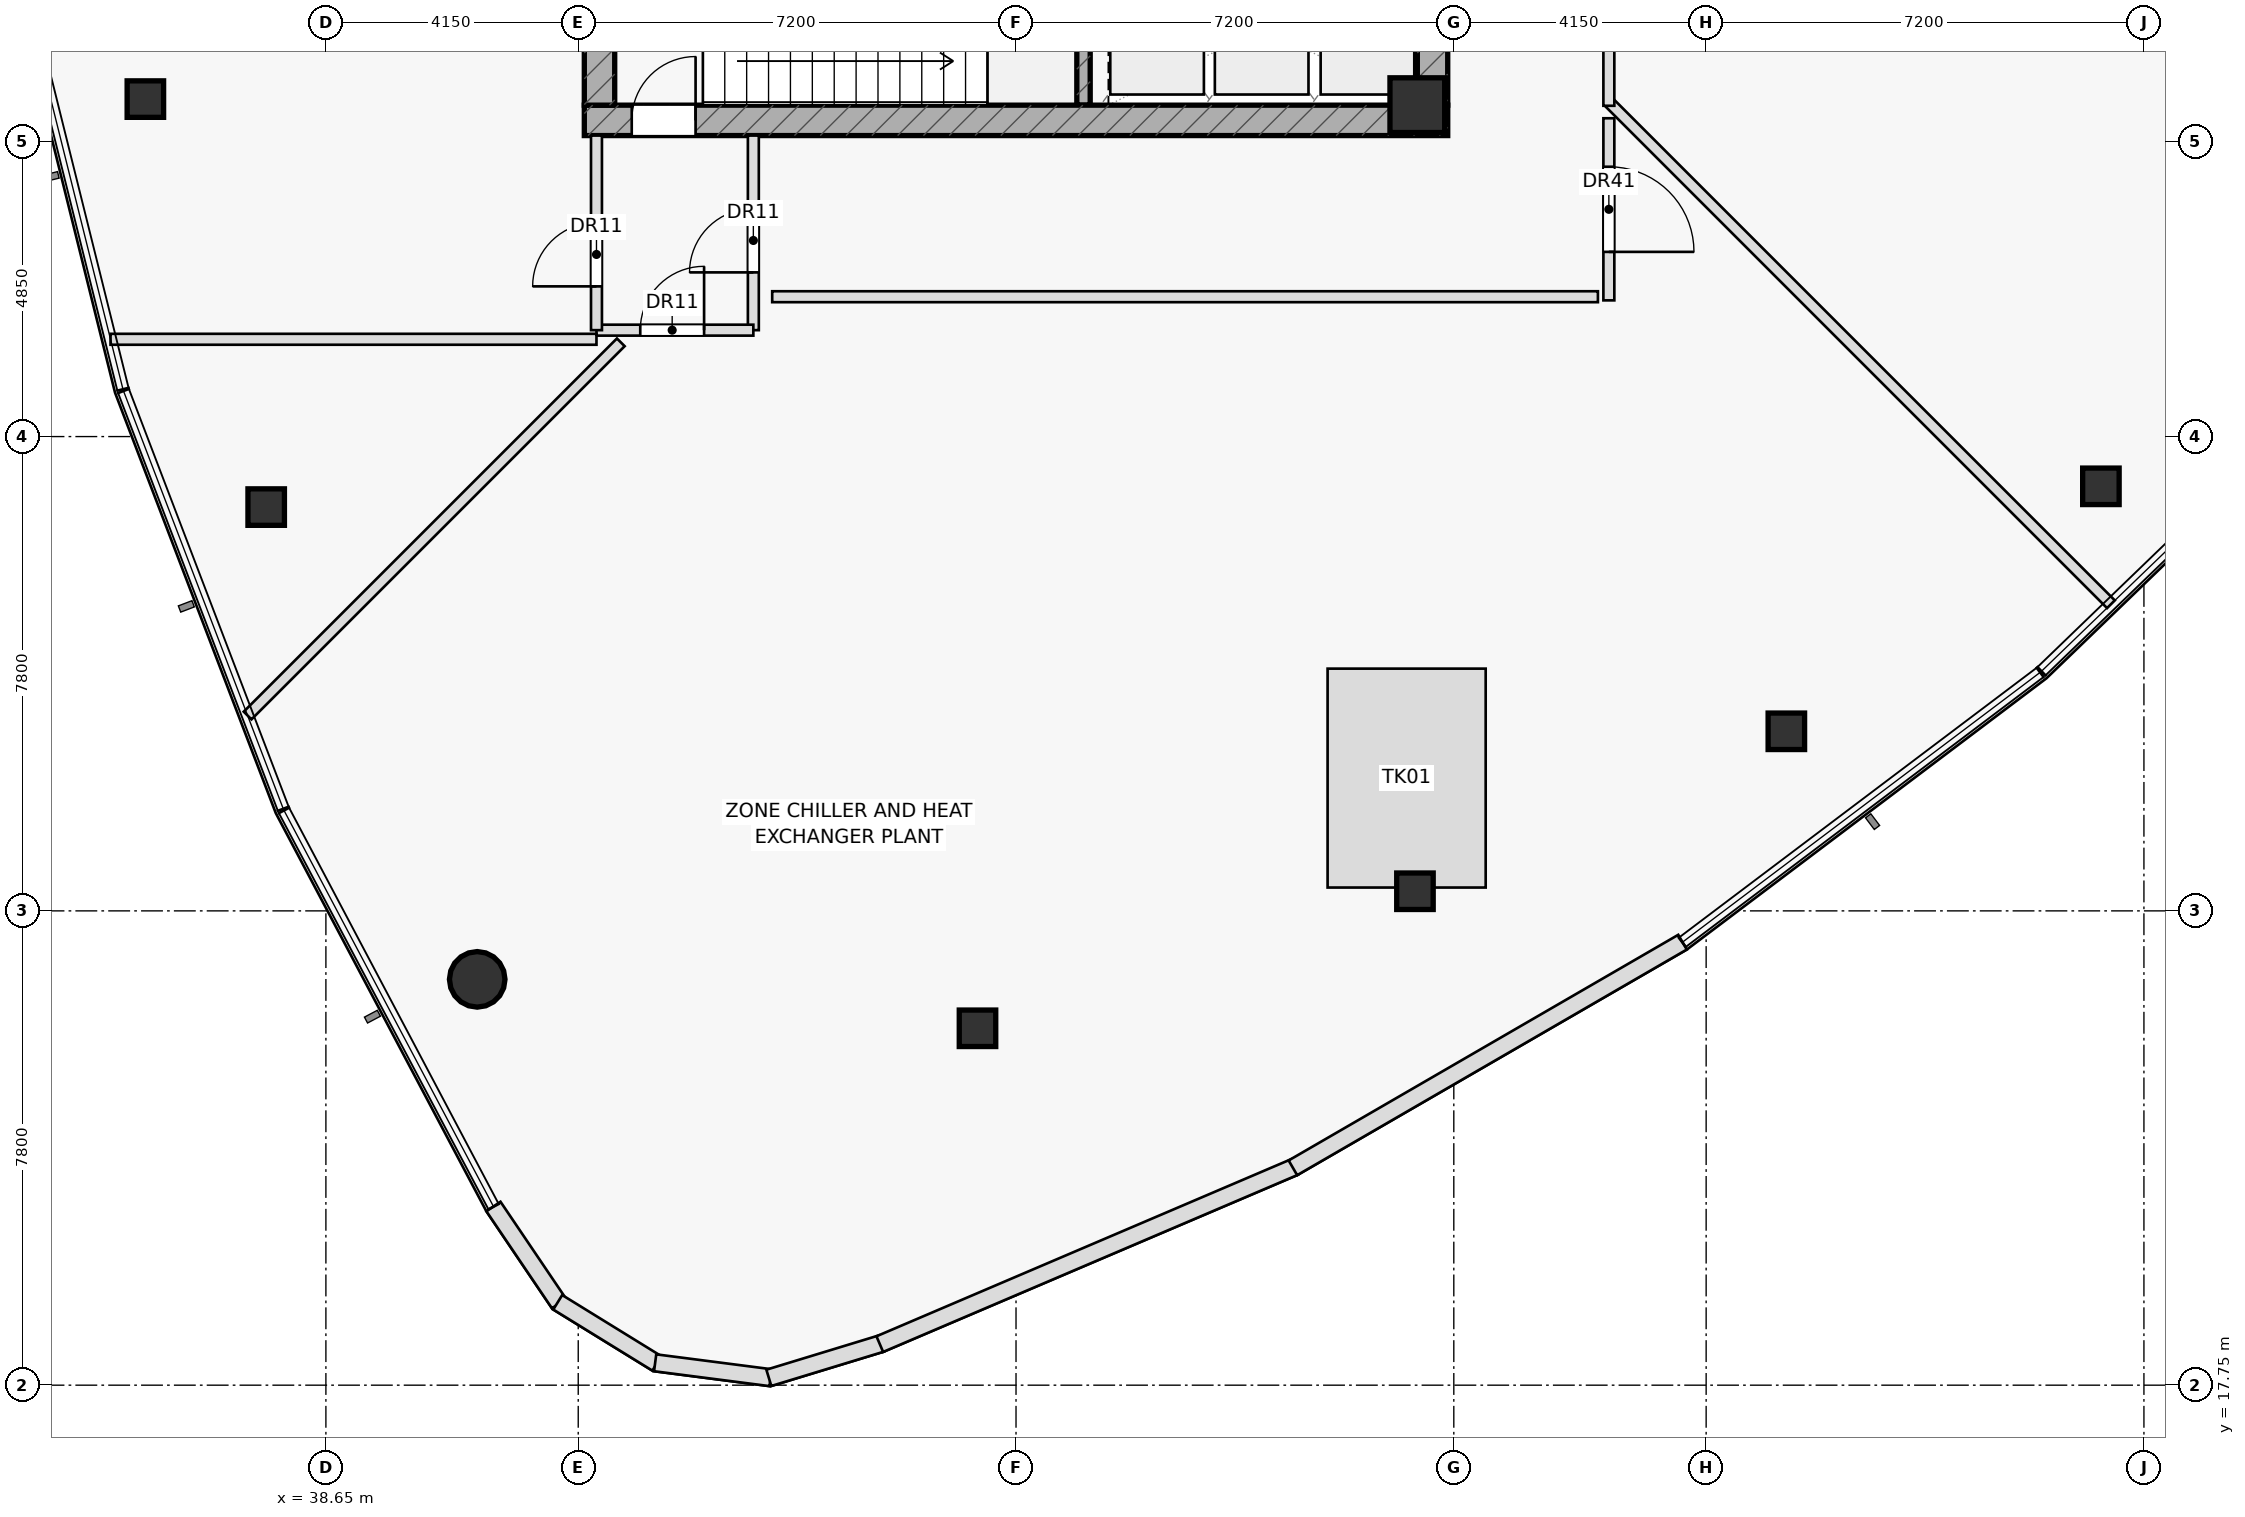
"""IFC4 building model, lengths in metres.
Left out: names, types, materials, properties, quantities, classifications, styles, units other than length and angle.
Written with IfcOpenShell. Run it as: python <this file> out.ifc"""

import sys

from ifc_helpers import new_model, si_unit, direction, frame, frame_2d, origin, origin_2d, place, context, subcontext, project, spatial, rectangle, hollow_rectangle, hollow_circle, extrude, element, fill, save


model = new_model("IFC4")
c1 = context("Model", 3, precision=1e-05, world=origin(), true_north=direction((0.0, 1.0)))
c2 = subcontext(c1, "Body", "Model", "MODEL_VIEW")
j1 = project(units=[si_unit("LENGTHUNIT", "METRE"), si_unit("PLANEANGLEUNIT", "RADIAN")], contexts=[c1])
p1 = place(None, origin())
s1 = spatial("IfcSite", under=j1, at=p1, CompositionType="ELEMENT")
p2 = place(p1, origin())
s2 = spatial("IfcBuilding", under=s1, at=p2, CompositionType="ELEMENT")
p3 = place(p2, frame((0.0, 0.0, 204.15)))
s3 = spatial("IfcBuildingStorey", under=s2, at=p3, CompositionType="ELEMENT", Elevation=204.15)
p4 = place(p3, frame((51.11, 38.8, 0.0), z_axis=(0.0, 0.0, 1.0), x_axis=(0.0, 1.0, 0.0)))
e1 = element("IfcWall", 1, at=p4, inside=s3, PredefinedType="SHEAR", context=c2, shape_type="SweptSolid", body=[
    extrude(rectangle(XDim=3.1, YDim=0.22, at=frame_2d((1.55, 0.0))), origin(), (0.0, 0.0, 1.0), 4.55),
])
p5 = place(p3, frame((42.9, 38.55, 0.0), z_axis=(0.0, 0.0, 1.0), x_axis=(1.0, 0.0, 0.0)))
e2 = element("IfcWall", 2, at=p5, inside=s3, PredefinedType="SHEAR", context=c2, shape_type="SweptSolid", body=[
    extrude(rectangle(XDim=14.2, YDim=0.5, at=frame_2d((7.1, 0.0))), origin(), (0.0, 0.0, 1.0), 4.55),
])
p6 = place(p5, frame((0.78, 0.0, 0.0)))
e3 = element("IfcOpeningElement", 3, at=p6, cuts=e2, PredefinedType="OPENING", context=c2, shape_type="SweptSolid", body=[
    extrude(rectangle(XDim=1.05, YDim=2.2, at=frame_2d((0.525, 1.1))), frame((0.0, 0.26, 0.0), z_axis=(0.0, -1.0, 0.0), x_axis=(1.0, 0.0, 0.0)), (0.0, 0.0, 1.0), 0.52),
])
p7 = place(p3, frame((43.15, 38.8, 0.0), z_axis=(0.0, 0.0, 1.0), x_axis=(0.0, 1.0, 0.0)))
e4 = element("IfcWall", 4, at=p7, inside=s3, PredefinedType="SHEAR", context=c2, shape_type="SweptSolid", body=[
    extrude(rectangle(XDim=12.4, YDim=0.5, at=frame_2d((6.2, 0.0))), origin(), (0.0, 0.0, 1.0), 4.55),
])
p8 = place(p3, frame((56.85, 38.8, 0.0), z_axis=(0.0, 0.0, 1.0), x_axis=(0.0, 1.0, 0.0)))
e5 = element("IfcWall", 5, at=p8, inside=s3, PredefinedType="SHEAR", context=c2, shape_type="SweptSolid", body=[
    extrude(rectangle(XDim=12.4, YDim=0.5, at=frame_2d((6.2, 0.0))), origin(), (0.0, 0.0, 1.0), 4.55),
])
p9 = place(p8, frame((3.85, 0.0, 0.0)))
e6 = element("IfcOpeningElement", 6, at=p9, cuts=e5, PredefinedType="OPENING", context=c2, shape_type="SweptSolid", body=[
    extrude(rectangle(XDim=1.5, YDim=2.2, at=frame_2d((0.75, 1.1))), frame((0.0, 0.26, 0.0), z_axis=(0.0, -1.0, 0.0), x_axis=(1.0, 0.0, 0.0)), (0.0, 0.0, 1.0), 0.52),
])
p10 = place(p3, frame((56.6, 38.8, 0.0), z_axis=(0.0, 0.0, 1.0), x_axis=(1.0, 0.0, 0.0)))
e7 = element("IfcColumn", 7, at=p10, inside=s3, PredefinedType="COLUMN", context=c2, shape_type="SweptSolid", body=[
    extrude(rectangle(XDim=0.9, YDim=0.9, at=origin_2d()), origin(), (0.0, 0.0, 1.0), 4.55),
])
for number, where, z_axis, x_axis in (
    (8, (35.681, 38.9, 0.0), (0.0, 0.0, 1.0), (1.0, 0.0, 0.0)),
    (9, (37.668, 32.19, 0.0), (0.0, 0.0, 1.0), (1.0, 0.0, 0.0)),
):
    element("IfcColumn", number, at=place(p3, frame(where, z_axis=z_axis, x_axis=x_axis)), inside=s3, PredefinedType="COLUMN", context=c2, shape_type="SweptSolid", body=[
        extrude(hollow_rectangle(XDim=0.6, YDim=0.6, WallThickness=0.036, at=origin_2d()), origin(), (0.0, 0.0, 1.0), 4.55),
    ])
p11 = place(p3, frame((41.139, 24.424, 0.0), z_axis=(0.0, 0.0, 1.0), x_axis=(1.0, 0.0, 0.0)))
e10 = element("IfcColumn", 10, at=p11, inside=s3, PredefinedType="COLUMN", context=c2, shape_type="SweptSolid", body=[
    extrude(hollow_circle(Radius=0.457, WallThickness=0.04, at=origin_2d()), origin(), (0.0, 0.0, 1.0), 4.55),
])
p12 = place(p3, frame((49.366, 23.619, 0.0), z_axis=(0.0, 0.0, 1.0), x_axis=(1.0, 0.0, 0.0)))
e11 = element("IfcColumn", 11, at=p12, inside=s3, PredefinedType="COLUMN", context=c2, shape_type="SweptSolid", body=[
    extrude(hollow_rectangle(XDim=0.6, YDim=0.6, WallThickness=0.036, at=origin_2d()), origin(), (0.0, 0.0, 1.0), 4.55),
])
for number, where, z_axis, x_axis in (
    (12, (56.561, 25.873, 0.0), (0.0, 0.0, 1.0), (1.0, 0.0, 0.0)),
    (13, (62.669, 28.503, 0.0), (0.0, 0.0, 1.0), (1.0, 0.0, 0.0)),
    (14, (67.842, 32.532, 0.0), (0.0, 0.0, 1.0), (1.0, 0.0, 0.0)),
):
    element("IfcColumn", number, at=place(p3, frame(where, z_axis=z_axis, x_axis=x_axis)), inside=s3, PredefinedType="COLUMN", context=c2, shape_type="SweptSolid", body=[
        extrude(hollow_rectangle(XDim=0.6, YDim=0.6, WallThickness=0.036, at=origin_2d()), origin(), (0.0, 0.0, 1.0), 5.0),
    ])
p13 = place(p3, frame((45.68, 35.1, 0.0), z_axis=(0.0, 0.0, 1.0), x_axis=(0.0, 1.0, 0.0)))
e15 = element("IfcWall", 15, at=p13, inside=s3, PredefinedType="PARTITIONING", context=c2, shape_type="SweptSolid", body=[
    extrude(rectangle(XDim=3.2, YDim=0.18, at=frame_2d((1.6, 0.0))), origin(), (0.0, 0.0, 1.0), 4.55),
])
p14 = place(p13, frame((0.95, 0.0, 0.0)))
e16 = element("IfcOpeningElement", 16, at=p14, cuts=e15, PredefinedType="OPENING", context=c2, shape_type="SweptSolid", body=[
    extrude(rectangle(XDim=1.05, YDim=2.2, at=frame_2d((0.525, 1.1))), frame((0.0, 0.1, 0.0), z_axis=(0.0, -1.0, 0.0), x_axis=(1.0, 0.0, 0.0)), (0.0, 0.0, 1.0), 0.2),
])
p15 = place(p3, frame((43.1, 35.1, 0.0), z_axis=(0.0, 0.0, 1.0), x_axis=(1.0, 0.0, 0.0)))
e17 = element("IfcWall", 17, at=p15, inside=s3, PredefinedType="PARTITIONING", context=c2, shape_type="SweptSolid", body=[
    extrude(rectangle(XDim=2.58, YDim=0.18, at=frame_2d((1.29, 0.0))), origin(), (0.0, 0.0, 1.0), 3.935),
])
p16 = place(p15, frame((0.72, 0.0, 0.0)))
e18 = element("IfcOpeningElement", 18, at=p16, cuts=e17, PredefinedType="OPENING", context=c2, shape_type="SweptSolid", body=[
    extrude(rectangle(XDim=1.05, YDim=2.2, at=frame_2d((0.525, 1.1))), frame((0.0, 0.1, 0.0), z_axis=(0.0, -1.0, 0.0), x_axis=(1.0, 0.0, 0.0)), (0.0, 0.0, 1.0), 0.2),
])
p17 = place(p3, frame((43.1, 35.1, 0.0), z_axis=(0.0, 0.0, 1.0), x_axis=(0.0, 1.0, 0.0)))
e19 = element("IfcWall", 19, at=p17, inside=s3, PredefinedType="PARTITIONING", context=c2, shape_type="SweptSolid", body=[
    extrude(rectangle(XDim=3.2, YDim=0.18, at=frame_2d((1.6, 0.0))), origin(), (0.0, 0.0, 1.0), 3.935),
])
p18 = place(p17, frame((0.72, 0.0, 0.0)))
e20 = element("IfcOpeningElement", 20, at=p18, cuts=e19, PredefinedType="OPENING", context=c2, shape_type="SweptSolid", body=[
    extrude(rectangle(XDim=1.05, YDim=2.2, at=frame_2d((0.525, 1.1))), frame((0.0, 0.1, 0.0), z_axis=(0.0, -1.0, 0.0), x_axis=(1.0, 0.0, 0.0)), (0.0, 0.0, 1.0), 0.2),
])
p19 = place(p3, frame((35.108, 34.95, 0.0), z_axis=(0.0, 0.0, 1.0), x_axis=(1.0, 0.0, 0.0)))
e21 = element("IfcWall", 21, at=p19, inside=s3, PredefinedType="PARTITIONING", context=c2, shape_type="SweptSolid", body=[
    extrude(rectangle(XDim=7.992, YDim=0.18, at=frame_2d((3.996, 0.0))), origin(), (0.0, 0.0, 1.0), 3.935),
])
p20 = place(p3, frame((43.5, 34.9, 0.0), z_axis=(0.0, 0.0, 1.0), x_axis=(-0.707106781187, -0.707106781187, 0.0)))
e22 = element("IfcWall", 22, at=p20, inside=s3, PredefinedType="PARTITIONING", context=c2, shape_type="SweptSolid", body=[
    extrude(rectangle(XDim=8.68, YDim=0.18, at=frame_2d((4.34, 0.0))), origin(), (0.0, 0.0, 1.0), 3.935),
])
p21 = place(p3, frame((59.75, 38.85, 0.0), z_axis=(0.0, 0.0, 1.0), x_axis=(0.707106781187, -0.707106781187, 0.0)))
e23 = element("IfcWall", 23, at=p21, inside=s3, PredefinedType="PARTITIONING", context=c2, shape_type="SweptSolid", body=[
    extrude(rectangle(XDim=11.678, YDim=0.18, at=frame_2d((5.839, 0.0))), origin(), (0.0, 0.0, 1.0), 3.935),
])
p22 = place(p3, frame((59.75, 49.366, 0.0), z_axis=(0.0, 0.0, 1.0), x_axis=(0.0, -1.0, 0.0)))
e24 = element("IfcWall", 24, at=p22, inside=s3, PredefinedType="PARTITIONING", context=c2, shape_type="SweptSolid", body=[
    extrude(rectangle(XDim=10.576, YDim=0.18, at=frame_2d((5.288, 0.0))), origin(), (0.0, 0.0, 1.0), 3.935),
])
p23 = place(p22, frame((4.588, 0.0, 0.0)))
e25 = element("IfcOpeningElement", 25, at=p23, cuts=e24, PredefinedType="OPENING", context=c2, shape_type="SweptSolid", body=[
    extrude(rectangle(XDim=1.4, YDim=2.15, at=frame_2d((0.7, 1.075))), frame((0.0, 0.1, 0.0), z_axis=(0.0, -1.0, 0.0), x_axis=(1.0, 0.0, 0.0)), (0.0, 0.0, 1.0), 0.2),
])
p24 = place(p3, frame((59.75, 38.585, 0.0), z_axis=(0.0, 0.0, 1.0), x_axis=(0.0, -1.0, 0.0)))
e26 = element("IfcWall", 26, at=p24, inside=s3, PredefinedType="PARTITIONING", context=c2, shape_type="SweptSolid", body=[
    extrude(rectangle(XDim=2.995, YDim=0.18, at=frame_2d((1.497, 0.0))), origin(), (0.0, 0.0, 1.0), 3.935),
])
p25 = place(p24, frame((0.797, 0.0, 0.0)))
e27 = element("IfcOpeningElement", 27, at=p25, cuts=e26, PredefinedType="OPENING", context=c2, shape_type="SweptSolid", body=[
    extrude(rectangle(XDim=1.4, YDim=2.15, at=frame_2d((0.7, 1.075))), frame((0.0, 0.1, 0.0), z_axis=(0.0, -1.0, 0.0), x_axis=(1.0, 0.0, 0.0)), (0.0, 0.0, 1.0), 0.2),
])
p26 = place(p3, frame((59.57, 35.65, 0.0), z_axis=(0.0, 0.0, 1.0), x_axis=(-1.0, 0.0, 0.0)))
e28 = element("IfcWall", 28, at=p26, inside=s3, PredefinedType="PARTITIONING", context=c2, shape_type="SweptSolid", body=[
    extrude(rectangle(XDim=13.58, YDim=0.18, at=frame_2d((6.79, 0.0))), origin(), (0.0, 0.0, 1.0), 3.935),
])
p27 = place(p3, frame((41.406, 20.689, 0.0), z_axis=(0.0, 0.0, 1.0), x_axis=(0.559866819168, -0.828582611931, 0.0)))
e29 = element("IfcWall", 29, at=p27, inside=s3, PredefinedType="STANDARD", context=c2, shape_type="SweptSolid", body=[
    extrude(rectangle(XDim=1.926, YDim=0.28, at=frame_2d((0.963, 0.0))), origin(), (0.0, 0.0, 1.0), 4.55),
])
for number, where, z_axis, x_axis in (
    (30, (42.463, 19.113, 0.0), (0.0, 0.0, 1.0), (0.851, -0.525, 0.0)),
    (31, (44.065, 18.118, 0.0), (0.0, 0.0, 1.0), (0.992, -0.128, 0.0)),
):
    element("IfcWall", number, at=place(p3, frame(where, z_axis=z_axis, x_axis=x_axis)), inside=s3, PredefinedType="STANDARD", context=c2, shape_type="SweptSolid", body=[
        extrude(rectangle(XDim=1.915, YDim=0.28, at=frame_2d((0.957, 0.0))), origin(), (0.0, 0.0, 1.0), 4.55),
    ])
p28 = place(p3, frame((45.935, 17.871, 0.0), z_axis=(0.0, 0.0, 1.0), x_axis=(0.956533353252, 0.291622948541, 0.0)))
e32 = element("IfcWall", 32, at=p28, inside=s3, PredefinedType="STANDARD", context=c2, shape_type="SweptSolid", body=[
    extrude(rectangle(XDim=1.937, YDim=0.28, at=frame_2d((0.969, 0.0))), origin(), (0.0, 0.0, 1.0), 4.55),
])
p29 = place(p3, frame((47.76, 18.425, 0.0), z_axis=(0.0, 0.0, 1.0), x_axis=(0.919661843006, 0.392711210075, 0.0)))
e33 = element("IfcWall", 33, at=p29, inside=s3, PredefinedType="STANDARD", context=c2, shape_type="SweptSolid", body=[
    extrude(rectangle(XDim=7.417, YDim=0.28, at=frame_2d((3.708, 0.0))), origin(), (0.0, 0.0, 1.0), 4.55),
])
p30 = place(p3, frame((54.554, 21.324, 0.0), z_axis=(0.0, 0.0, 1.0), x_axis=(0.865378125322, 0.501119447052, 0.0)))
e34 = element("IfcWall", 34, at=p30, inside=s3, PredefinedType="STANDARD", context=c2, shape_type="SweptSolid", body=[
    extrude(rectangle(XDim=7.405, YDim=0.28, at=frame_2d((3.702, 0.0))), origin(), (0.0, 0.0, 1.0), 4.55),
])
p31 = place(p6, origin())
e35 = element("IfcDoor", 35, at=p31, inside=s3, OperationType="SINGLE_SWING_RIGHT", PredefinedType="DOOR", context=c2, shape_type="SweptSolid", body=[
    extrude(rectangle(XDim=1.05, YDim=2.2, at=frame_2d((0.525, 1.1))), frame((0.0, 0.025, 0.0), z_axis=(0.0, -1.0, 0.0), x_axis=(1.0, 0.0, 0.0)), (0.0, 0.0, 1.0), 0.05),
])
fill(e3, e35)
p32 = place(p14, origin())
e36 = element("IfcDoor", 36, at=p32, inside=s3, OperationType="SINGLE_SWING_LEFT", PredefinedType="DOOR", context=c2, shape_type="SweptSolid", body=[
    extrude(rectangle(XDim=1.05, YDim=2.2, at=frame_2d((0.525, 1.1))), frame((0.0, 0.025, 0.0), z_axis=(0.0, -1.0, 0.0), x_axis=(1.0, 0.0, 0.0)), (0.0, 0.0, 1.0), 0.05),
])
fill(e16, e36)
p33 = place(p16, origin())
e37 = element("IfcDoor", 37, at=p33, inside=s3, OperationType="SINGLE_SWING_RIGHT", PredefinedType="DOOR", context=c2, shape_type="SweptSolid", body=[
    extrude(rectangle(XDim=1.05, YDim=2.2, at=frame_2d((0.525, 1.1))), frame((0.0, 0.025, 0.0), z_axis=(0.0, -1.0, 0.0), x_axis=(1.0, 0.0, 0.0)), (0.0, 0.0, 1.0), 0.05),
])
fill(e18, e37)
p34 = place(p18, origin())
e38 = element("IfcDoor", 38, at=p34, inside=s3, OperationType="SINGLE_SWING_LEFT", PredefinedType="DOOR", context=c2, shape_type="SweptSolid", body=[
    extrude(rectangle(XDim=1.05, YDim=2.2, at=frame_2d((0.525, 1.1))), frame((0.0, 0.025, 0.0), z_axis=(0.0, -1.0, 0.0), x_axis=(1.0, 0.0, 0.0)), (0.0, 0.0, 1.0), 0.05),
])
fill(e20, e38)
p35 = place(p25, origin())
e39 = element("IfcDoor", 39, at=p35, inside=s3, OperationType="SINGLE_SWING_RIGHT", PredefinedType="DOOR", context=c2, shape_type="SweptSolid", body=[
    extrude(rectangle(XDim=1.4, YDim=2.15, at=frame_2d((0.7, 1.075))), frame((0.0, 0.025, 0.0), z_axis=(0.0, -1.0, 0.0), x_axis=(1.0, 0.0, 0.0)), (0.0, 0.0, 1.0), 0.05),
])
fill(e27, e39)
save(model, sys.argv[1])
